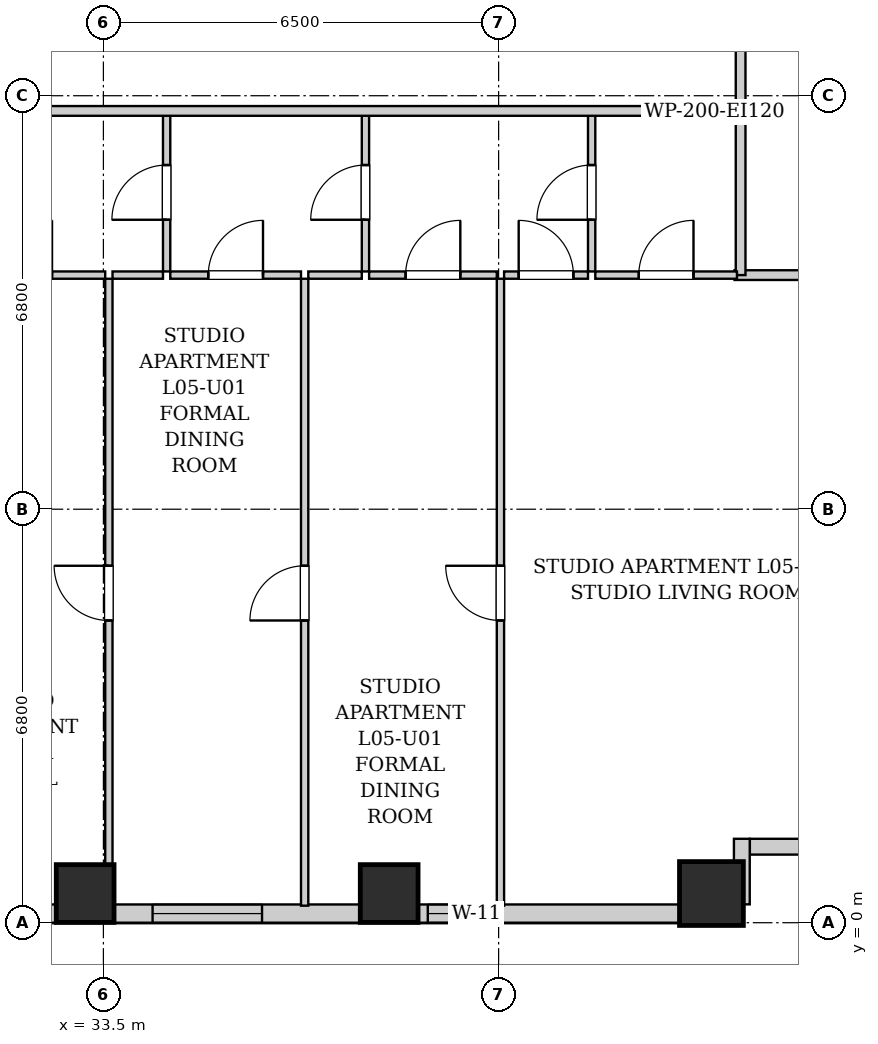
"""IFC4 building model, lengths in metres.
Left out: names, types, materials, properties, quantities, classifications, styles, units other than length and angle.
Written with IfcOpenShell. Run it as: python <this file> out.ifc"""

import sys

from ifc_helpers import new_model, si_unit, direction, frame, frame_2d, origin, origin_2d, place, context, subcontext, project, spatial, rectangle, extrude, element, fill, save


model = new_model("IFC4")
c1 = context("Model", 3, precision=1e-05, world=origin(), true_north=direction((0.0, 1.0)))
c2 = subcontext(c1, "Body", "Model", "MODEL_VIEW")
j1 = project(units=[si_unit("LENGTHUNIT", "METRE"), si_unit("PLANEANGLEUNIT", "RADIAN")], contexts=[c1])
p1 = place(None, origin())
s1 = spatial("IfcSite", under=j1, at=p1, CompositionType="ELEMENT")
p2 = place(p1, origin())
s2 = spatial("IfcBuilding", under=s1, at=p2, CompositionType="ELEMENT")
p3 = place(p2, frame((0.0, 0.0, 25.8)))
s3 = spatial("IfcBuildingStorey", under=s2, at=p3, CompositionType="ELEMENT", Elevation=25.8)
for number, where, z_axis, x_axis in (
    (1, (33.2, 0.48, 0.0), (0.0, 0.0, 1.0), (1.0, 0.0, 0.0)),
    (2, (38.2, 0.48, 0.0), (0.0, 0.0, 1.0), (1.0, 0.0, 0.0)),
):
    element("IfcColumn", number, at=place(p3, frame(where, z_axis=z_axis, x_axis=x_axis)), inside=s3, PredefinedType="COLUMN", context=c2, shape_type="SweptSolid", body=[
        extrude(rectangle(XDim=0.95, YDim=0.95, at=origin_2d()), origin(), (0.0, 0.0, 1.0), 3.2),
    ])
p4 = place(p3, frame((43.5, 0.48, 0.0), z_axis=(0.0, 0.0, 1.0), x_axis=(1.0, 0.0, 0.0)))
e3 = element("IfcColumn", 3, at=p4, inside=s3, PredefinedType="COLUMN", context=c2, shape_type="SweptSolid", body=[
    extrude(rectangle(XDim=1.05, YDim=1.05, at=origin_2d()), origin(), (0.0, 0.0, 1.0), 3.2),
])
p5 = place(p3, frame((44.0, 0.15, 0.0), z_axis=(0.0, 0.0, 1.0), x_axis=(-1.0, 0.0, 0.0)))
e4 = element("IfcWall", 4, at=p5, inside=s3, PredefinedType="SOLIDWALL", context=c2, shape_type="SweptSolid", body=[
    extrude(rectangle(XDim=28.1, YDim=0.3, at=frame_2d((14.05, 0.0))), origin(), (0.0, 0.0, 1.0), 1.975),
])
p6 = place(p5, frame((26.835, 0.0, 0.55)))
e5 = element("IfcOpeningElement", 5, at=p6, cuts=e4, PredefinedType="OPENING", context=c2, shape_type="SweptSolid", body=[
    extrude(rectangle(XDim=0.85, YDim=1.2, at=frame_2d((0.425, 0.6))), frame((0.0, 0.16, 0.0), z_axis=(0.0, -1.0, 0.0), x_axis=(1.0, 0.0, 0.0)), (0.0, 0.0, 1.0), 0.32),
])
p7 = place(p5, frame((23.765, 0.0, 0.55)))
e6 = element("IfcOpeningElement", 6, at=p7, cuts=e4, PredefinedType="OPENING", context=c2, shape_type="SweptSolid", body=[
    extrude(rectangle(XDim=1.8, YDim=1.2, at=frame_2d((0.9, 0.6))), frame((0.0, 0.16, 0.0), z_axis=(0.0, -1.0, 0.0), x_axis=(1.0, 0.0, 0.0)), (0.0, 0.0, 1.0), 0.32),
])
p8 = place(p5, frame((21.5, 0.0, 0.55)))
e7 = element("IfcOpeningElement", 7, at=p8, cuts=e4, PredefinedType="OPENING", context=c2, shape_type="SweptSolid", body=[
    extrude(rectangle(XDim=1.35, YDim=1.2, at=frame_2d((0.675, 0.6))), frame((0.0, 0.16, 0.0), z_axis=(0.0, -1.0, 0.0), x_axis=(1.0, 0.0, 0.0)), (0.0, 0.0, 1.0), 0.32),
])
p9 = place(p5, frame((14.352, 0.0, 0.55)))
e8 = element("IfcOpeningElement", 8, at=p9, cuts=e4, PredefinedType="OPENING", context=c2, shape_type="SweptSolid", body=[
    extrude(rectangle(XDim=1.8, YDim=1.2, at=frame_2d((0.9, 0.6))), frame((0.0, 0.16, 0.0), z_axis=(0.0, -1.0, 0.0), x_axis=(1.0, 0.0, 0.0)), (0.0, 0.0, 1.0), 0.32),
])
p10 = place(p5, frame((11.435, 0.0, 0.55)))
e9 = element("IfcOpeningElement", 9, at=p10, cuts=e4, PredefinedType="OPENING", context=c2, shape_type="SweptSolid", body=[
    extrude(rectangle(XDim=1.8, YDim=1.2, at=frame_2d((0.9, 0.6))), frame((0.0, 0.16, 0.0), z_axis=(0.0, -1.0, 0.0), x_axis=(1.0, 0.0, 0.0)), (0.0, 0.0, 1.0), 0.32),
])
p11 = place(p5, frame((7.891, 0.0, 0.55)))
e10 = element("IfcOpeningElement", 10, at=p11, cuts=e4, PredefinedType="OPENING", context=c2, shape_type="SweptSolid", body=[
    extrude(rectangle(XDim=1.8, YDim=1.2, at=frame_2d((0.9, 0.6))), frame((0.0, 0.16, 0.0), z_axis=(0.0, -1.0, 0.0), x_axis=(1.0, 0.0, 0.0)), (0.0, 0.0, 1.0), 0.32),
])
p12 = place(p5, frame((4.315, 0.0, 0.55)))
e11 = element("IfcOpeningElement", 11, at=p12, cuts=e4, PredefinedType="OPENING", context=c2, shape_type="SweptSolid", body=[
    extrude(rectangle(XDim=0.85, YDim=1.2, at=frame_2d((0.425, 0.6))), frame((0.0, 0.16, 0.0), z_axis=(0.0, -1.0, 0.0), x_axis=(1.0, 0.0, 0.0)), (0.0, 0.0, 1.0), 0.32),
])
p13 = place(p3, frame((45.118, 1.25, 0.0), z_axis=(0.0, 0.0, 1.0), x_axis=(-1.0, 0.0, 0.0)))
e12 = element("IfcWall", 12, at=p13, inside=s3, PredefinedType="SOLIDWALL", context=c2, shape_type="SweptSolid", body=[
    extrude(rectangle(XDim=0.986, YDim=0.26, at=frame_2d((0.493, 0.0))), origin(), (0.0, 0.0, 1.0), 2.94),
])
p14 = place(p3, frame((44.0, 1.38, 0.0), z_axis=(0.0, 0.0, 1.0), x_axis=(0.0, -1.0, 0.0)))
e13 = element("IfcWall", 13, at=p14, inside=s3, PredefinedType="SOLIDWALL", context=c2, shape_type="SweptSolid", body=[
    extrude(rectangle(XDim=1.078, YDim=0.26, at=frame_2d((0.539, 0.0))), origin(), (0.0, 0.0, 1.0), 2.94),
])
p15 = place(p3, frame((43.98, 13.35, 0.0), z_axis=(0.0, 0.0, 1.0), x_axis=(0.0, 1.0, 0.0)))
e14 = element("IfcWall", 14, at=p15, inside=s3, PredefinedType="PARTITIONING", context=c2, shape_type="SweptSolid", body=[
    extrude(rectangle(XDim=1.74, YDim=0.16, at=frame_2d((0.87, 0.0))), origin(), (0.0, 0.0, 1.0), 2.94),
])
p16 = place(p3, frame((43.88, 10.65, 0.0), z_axis=(0.0, 0.0, 1.0), x_axis=(1.0, 0.0, 0.0)))
e15 = element("IfcWall", 15, at=p16, inside=s3, PredefinedType="PARTITIONING", context=c2, shape_type="SweptSolid", body=[
    extrude(rectangle(XDim=2.34, YDim=0.16, at=frame_2d((1.17, 0.0))), origin(), (0.0, 0.0, 1.0), 2.94),
])
p17 = place(p3, frame((43.98, 10.65, 0.0), z_axis=(0.0, 0.0, 1.0), x_axis=(0.0, 1.0, 0.0)))
e16 = element("IfcWall", 16, at=p17, inside=s3, PredefinedType="PARTITIONING", context=c2, shape_type="SweptSolid", body=[
    extrude(rectangle(XDim=2.66, YDim=0.16, at=frame_2d((1.33, 0.0))), origin(), (0.0, 0.0, 1.0), 2.94),
])
p18 = place(p3, frame((34.54, 10.71, 0.0), z_axis=(0.0, 0.0, 1.0), x_axis=(0.0, 1.0, 0.0)))
e17 = element("IfcWall", 17, at=p18, inside=s3, PredefinedType="PARTITIONING", context=c2, shape_type="SweptSolid", body=[
    extrude(rectangle(XDim=2.6, YDim=0.12, at=frame_2d((1.3, 0.0))), origin(), (0.0, 0.0, 1.0), 2.94),
])
p19 = place(p18, frame((0.85, 0.0, 0.0)))
e18 = element("IfcOpeningElement", 18, at=p19, cuts=e17, PredefinedType="OPENING", context=c2, shape_type="SweptSolid", body=[
    extrude(rectangle(XDim=0.9, YDim=2.05, at=frame_2d((0.45, 1.025))), frame((0.0, 0.07, 0.0), z_axis=(0.0, -1.0, 0.0), x_axis=(1.0, 0.0, 0.0)), (0.0, 0.0, 1.0), 0.14),
])
p20 = place(p3, frame((30.88, 10.65, 0.0), z_axis=(0.0, 0.0, 1.0), x_axis=(1.0, 0.0, 0.0)))
e19 = element("IfcWall", 19, at=p20, inside=s3, PredefinedType="PARTITIONING", context=c2, shape_type="SweptSolid", body=[
    extrude(rectangle(XDim=2.65, YDim=0.12, at=frame_2d((1.325, 0.0))), origin(), (0.0, 0.0, 1.0), 2.94),
])
p21 = place(p20, frame((0.875, 0.0, 0.0)))
e20 = element("IfcOpeningElement", 20, at=p21, cuts=e19, PredefinedType="OPENING", context=c2, shape_type="SweptSolid", body=[
    extrude(rectangle(XDim=0.9, YDim=2.05, at=frame_2d((0.45, 1.025))), frame((0.0, 0.07, 0.0), z_axis=(0.0, -1.0, 0.0), x_axis=(1.0, 0.0, 0.0)), (0.0, 0.0, 1.0), 0.14),
])
p22 = place(p3, frame((33.65, 10.65, 0.0), z_axis=(0.0, 0.0, 1.0), x_axis=(1.0, 0.0, 0.0)))
e21 = element("IfcWall", 21, at=p22, inside=s3, PredefinedType="PARTITIONING", context=c2, shape_type="SweptSolid", body=[
    extrude(rectangle(XDim=0.83, YDim=0.12, at=frame_2d((0.415, 0.0))), origin(), (0.0, 0.0, 1.0), 2.94),
])
p23 = place(p3, frame((37.81, 10.71, 0.0), z_axis=(0.0, 0.0, 1.0), x_axis=(0.0, 1.0, 0.0)))
e22 = element("IfcWall", 22, at=p23, inside=s3, PredefinedType="PARTITIONING", context=c2, shape_type="SweptSolid", body=[
    extrude(rectangle(XDim=2.6, YDim=0.12, at=frame_2d((1.3, 0.0))), origin(), (0.0, 0.0, 1.0), 2.94),
])
p24 = place(p23, frame((0.85, 0.0, 0.0)))
e23 = element("IfcOpeningElement", 23, at=p24, cuts=e22, PredefinedType="OPENING", context=c2, shape_type="SweptSolid", body=[
    extrude(rectangle(XDim=0.9, YDim=2.05, at=frame_2d((0.45, 1.025))), frame((0.0, 0.07, 0.0), z_axis=(0.0, -1.0, 0.0), x_axis=(1.0, 0.0, 0.0)), (0.0, 0.0, 1.0), 0.14),
])
p25 = place(p3, frame((34.6, 10.65, 0.0), z_axis=(0.0, 0.0, 1.0), x_axis=(1.0, 0.0, 0.0)))
e24 = element("IfcWall", 24, at=p25, inside=s3, PredefinedType="PARTITIONING", context=c2, shape_type="SweptSolid", body=[
    extrude(rectangle(XDim=2.15, YDim=0.12, at=frame_2d((1.075, 0.0))), origin(), (0.0, 0.0, 1.0), 2.94),
])
p26 = place(p25, frame((0.625, 0.0, 0.0)))
e25 = element("IfcOpeningElement", 25, at=p26, cuts=e24, PredefinedType="OPENING", context=c2, shape_type="SweptSolid", body=[
    extrude(rectangle(XDim=0.9, YDim=2.05, at=frame_2d((0.45, 1.025))), frame((0.0, 0.07, 0.0), z_axis=(0.0, -1.0, 0.0), x_axis=(1.0, 0.0, 0.0)), (0.0, 0.0, 1.0), 0.14),
])
p27 = place(p3, frame((36.87, 10.65, 0.0), z_axis=(0.0, 0.0, 1.0), x_axis=(1.0, 0.0, 0.0)))
e26 = element("IfcWall", 26, at=p27, inside=s3, PredefinedType="PARTITIONING", context=c2, shape_type="SweptSolid", body=[
    extrude(rectangle(XDim=0.88, YDim=0.12, at=frame_2d((0.44, 0.0))), origin(), (0.0, 0.0, 1.0), 2.94),
])
p28 = place(p3, frame((41.53, 10.71, 0.0), z_axis=(0.0, 0.0, 1.0), x_axis=(0.0, 1.0, 0.0)))
e27 = element("IfcWall", 27, at=p28, inside=s3, PredefinedType="PARTITIONING", context=c2, shape_type="SweptSolid", body=[
    extrude(rectangle(XDim=2.6, YDim=0.12, at=frame_2d((1.3, 0.0))), origin(), (0.0, 0.0, 1.0), 2.94),
])
p29 = place(p28, frame((0.85, 0.0, 0.0)))
e28 = element("IfcOpeningElement", 28, at=p29, cuts=e27, PredefinedType="OPENING", context=c2, shape_type="SweptSolid", body=[
    extrude(rectangle(XDim=0.9, YDim=2.05, at=frame_2d((0.45, 1.025))), frame((0.0, 0.07, 0.0), z_axis=(0.0, -1.0, 0.0), x_axis=(1.0, 0.0, 0.0)), (0.0, 0.0, 1.0), 0.14),
])
p30 = place(p3, frame((37.87, 10.65, 0.0), z_axis=(0.0, 0.0, 1.0), x_axis=(1.0, 0.0, 0.0)))
e29 = element("IfcWall", 29, at=p30, inside=s3, PredefinedType="PARTITIONING", context=c2, shape_type="SweptSolid", body=[
    extrude(rectangle(XDim=2.1, YDim=0.12, at=frame_2d((1.05, 0.0))), origin(), (0.0, 0.0, 1.0), 2.94),
])
p31 = place(p30, frame((0.6, 0.0, 0.0)))
e30 = element("IfcOpeningElement", 30, at=p31, cuts=e29, PredefinedType="OPENING", context=c2, shape_type="SweptSolid", body=[
    extrude(rectangle(XDim=0.9, YDim=2.05, at=frame_2d((0.45, 1.025))), frame((0.0, 0.07, 0.0), z_axis=(0.0, -1.0, 0.0), x_axis=(1.0, 0.0, 0.0)), (0.0, 0.0, 1.0), 0.14),
])
p32 = place(p3, frame((40.09, 10.65, 0.0), z_axis=(0.0, 0.0, 1.0), x_axis=(1.0, 0.0, 0.0)))
e31 = element("IfcWall", 31, at=p32, inside=s3, PredefinedType="PARTITIONING", context=c2, shape_type="SweptSolid", body=[
    extrude(rectangle(XDim=1.38, YDim=0.12, at=frame_2d((0.69, 0.0))), origin(), (0.0, 0.0, 1.0), 2.94),
])
p33 = place(p32, frame((0.24, 0.0, 0.0)))
e32 = element("IfcOpeningElement", 32, at=p33, cuts=e31, PredefinedType="OPENING", context=c2, shape_type="SweptSolid", body=[
    extrude(rectangle(XDim=0.9, YDim=2.05, at=frame_2d((0.45, 1.025))), frame((0.0, 0.07, 0.0), z_axis=(0.0, -1.0, 0.0), x_axis=(1.0, 0.0, 0.0)), (0.0, 0.0, 1.0), 0.14),
])
p34 = place(p3, frame((41.59, 10.65, 0.0), z_axis=(0.0, 0.0, 1.0), x_axis=(1.0, 0.0, 0.0)))
e33 = element("IfcWall", 33, at=p34, inside=s3, PredefinedType="PARTITIONING", context=c2, shape_type="SweptSolid", body=[
    extrude(rectangle(XDim=2.33, YDim=0.12, at=frame_2d((1.165, 0.0))), origin(), (0.0, 0.0, 1.0), 2.94),
])
p35 = place(p34, frame((0.715, 0.0, 0.0)))
e34 = element("IfcOpeningElement", 34, at=p35, cuts=e33, PredefinedType="OPENING", context=c2, shape_type="SweptSolid", body=[
    extrude(rectangle(XDim=0.9, YDim=2.05, at=frame_2d((0.45, 1.025))), frame((0.0, 0.07, 0.0), z_axis=(0.0, -1.0, 0.0), x_axis=(1.0, 0.0, 0.0)), (0.0, 0.0, 1.0), 0.14),
])
p36 = place(p3, frame((33.59, 0.28, 0.0), z_axis=(0.0, 0.0, 1.0), x_axis=(0.0, 1.0, 0.0)))
e35 = element("IfcWall", 35, at=p36, inside=s3, PredefinedType="PARTITIONING", context=c2, shape_type="SweptSolid", body=[
    extrude(rectangle(XDim=10.31, YDim=0.12, at=frame_2d((5.155, 0.0))), origin(), (0.0, 0.0, 1.0), 2.94),
])
p37 = place(p36, frame((4.69, 0.0, 0.0)))
e36 = element("IfcOpeningElement", 36, at=p37, cuts=e35, PredefinedType="OPENING", context=c2, shape_type="SweptSolid", body=[
    extrude(rectangle(XDim=0.9, YDim=2.05, at=frame_2d((0.45, 1.025))), frame((0.0, 0.07, 0.0), z_axis=(0.0, -1.0, 0.0), x_axis=(1.0, 0.0, 0.0)), (0.0, 0.0, 1.0), 0.14),
])
p38 = place(p3, frame((36.81, 0.28, 0.0), z_axis=(0.0, 0.0, 1.0), x_axis=(0.0, 1.0, 0.0)))
e37 = element("IfcWall", 37, at=p38, inside=s3, PredefinedType="PARTITIONING", context=c2, shape_type="SweptSolid", body=[
    extrude(rectangle(XDim=10.31, YDim=0.12, at=frame_2d((5.155, 0.0))), origin(), (0.0, 0.0, 1.0), 2.94),
])
p39 = place(p38, frame((4.69, 0.0, 0.0)))
e38 = element("IfcOpeningElement", 38, at=p39, cuts=e37, PredefinedType="OPENING", context=c2, shape_type="SweptSolid", body=[
    extrude(rectangle(XDim=0.9, YDim=2.05, at=frame_2d((0.45, 1.025))), frame((0.0, 0.07, 0.0), z_axis=(0.0, -1.0, 0.0), x_axis=(1.0, 0.0, 0.0)), (0.0, 0.0, 1.0), 0.14),
])
p40 = place(p3, frame((40.03, 0.28, 0.0), z_axis=(0.0, 0.0, 1.0), x_axis=(0.0, 1.0, 0.0)))
e39 = element("IfcWall", 39, at=p40, inside=s3, PredefinedType="PARTITIONING", context=c2, shape_type="SweptSolid", body=[
    extrude(rectangle(XDim=10.31, YDim=0.12, at=frame_2d((5.155, 0.0))), origin(), (0.0, 0.0, 1.0), 2.94),
])
p41 = place(p40, frame((4.69, 0.0, 0.0)))
e40 = element("IfcOpeningElement", 40, at=p41, cuts=e39, PredefinedType="OPENING", context=c2, shape_type="SweptSolid", body=[
    extrude(rectangle(XDim=0.9, YDim=2.05, at=frame_2d((0.45, 1.025))), frame((0.0, 0.07, 0.0), z_axis=(0.0, -1.0, 0.0), x_axis=(1.0, 0.0, 0.0)), (0.0, 0.0, 1.0), 0.14),
])
p42 = place(p3, frame((10.05, 13.35, 0.0), z_axis=(0.0, 0.0, 1.0), x_axis=(1.0, 0.0, 0.0)))
e41 = element("IfcWall", 41, at=p42, inside=s3, PredefinedType="PARTITIONING", context=c2, shape_type="SweptSolid", body=[
    extrude(rectangle(XDim=33.9, YDim=0.16, at=frame_2d((16.95, 0.0))), origin(), (0.0, 0.0, 1.0), 2.94),
])
p43 = place(p42, frame((4.165, 0.0, 0.0)))
e42 = element("IfcOpeningElement", 42, at=p43, cuts=e41, PredefinedType="OPENING", context=c2, shape_type="SweptSolid", body=[
    extrude(rectangle(XDim=0.95, YDim=2.1, at=frame_2d((0.475, 1.05))), frame((0.0, 0.09, 0.0), z_axis=(0.0, -1.0, 0.0), x_axis=(1.0, 0.0, 0.0)), (0.0, 0.0, 1.0), 0.18),
])
p44 = place(p19, origin())
e43 = element("IfcDoor", 43, at=p44, inside=s3, OperationType="SINGLE_SWING_LEFT", PredefinedType="DOOR", context=c2, shape_type="SweptSolid", body=[
    extrude(rectangle(XDim=0.9, YDim=2.05, at=frame_2d((0.45, 1.025))), frame((0.0, 0.025, 0.0), z_axis=(0.0, -1.0, 0.0), x_axis=(1.0, 0.0, 0.0)), (0.0, 0.0, 1.0), 0.05),
])
fill(e18, e43)
p45 = place(p21, origin())
e44 = element("IfcDoor", 44, at=p45, inside=s3, OperationType="SINGLE_SWING_RIGHT", PredefinedType="DOOR", context=c2, shape_type="SweptSolid", body=[
    extrude(rectangle(XDim=0.9, YDim=2.05, at=frame_2d((0.45, 1.025))), frame((0.0, 0.025, 0.0), z_axis=(0.0, -1.0, 0.0), x_axis=(1.0, 0.0, 0.0)), (0.0, 0.0, 1.0), 0.05),
])
fill(e20, e44)
p46 = place(p24, origin())
e45 = element("IfcDoor", 45, at=p46, inside=s3, OperationType="SINGLE_SWING_LEFT", PredefinedType="DOOR", context=c2, shape_type="SweptSolid", body=[
    extrude(rectangle(XDim=0.9, YDim=2.05, at=frame_2d((0.45, 1.025))), frame((0.0, 0.025, 0.0), z_axis=(0.0, -1.0, 0.0), x_axis=(1.0, 0.0, 0.0)), (0.0, 0.0, 1.0), 0.05),
])
fill(e23, e45)
p47 = place(p26, origin())
e46 = element("IfcDoor", 46, at=p47, inside=s3, OperationType="SINGLE_SWING_RIGHT", PredefinedType="DOOR", context=c2, shape_type="SweptSolid", body=[
    extrude(rectangle(XDim=0.9, YDim=2.05, at=frame_2d((0.45, 1.025))), frame((0.0, 0.025, 0.0), z_axis=(0.0, -1.0, 0.0), x_axis=(1.0, 0.0, 0.0)), (0.0, 0.0, 1.0), 0.05),
])
fill(e25, e46)
p48 = place(p29, origin())
e47 = element("IfcDoor", 47, at=p48, inside=s3, OperationType="SINGLE_SWING_LEFT", PredefinedType="DOOR", context=c2, shape_type="SweptSolid", body=[
    extrude(rectangle(XDim=0.9, YDim=2.05, at=frame_2d((0.45, 1.025))), frame((0.0, 0.025, 0.0), z_axis=(0.0, -1.0, 0.0), x_axis=(1.0, 0.0, 0.0)), (0.0, 0.0, 1.0), 0.05),
])
fill(e28, e47)
p49 = place(p31, origin())
e48 = element("IfcDoor", 48, at=p49, inside=s3, OperationType="SINGLE_SWING_RIGHT", PredefinedType="DOOR", context=c2, shape_type="SweptSolid", body=[
    extrude(rectangle(XDim=0.9, YDim=2.05, at=frame_2d((0.45, 1.025))), frame((0.0, 0.025, 0.0), z_axis=(0.0, -1.0, 0.0), x_axis=(1.0, 0.0, 0.0)), (0.0, 0.0, 1.0), 0.05),
])
fill(e30, e48)
p50 = place(p33, origin())
e49 = element("IfcDoor", 49, at=p50, inside=s3, OperationType="SINGLE_SWING_LEFT", PredefinedType="DOOR", context=c2, shape_type="SweptSolid", body=[
    extrude(rectangle(XDim=0.9, YDim=2.05, at=frame_2d((0.45, 1.025))), frame((0.0, 0.025, 0.0), z_axis=(0.0, -1.0, 0.0), x_axis=(1.0, 0.0, 0.0)), (0.0, 0.0, 1.0), 0.05),
])
fill(e32, e49)
p51 = place(p35, origin())
e50 = element("IfcDoor", 50, at=p51, inside=s3, OperationType="SINGLE_SWING_RIGHT", PredefinedType="DOOR", context=c2, shape_type="SweptSolid", body=[
    extrude(rectangle(XDim=0.9, YDim=2.05, at=frame_2d((0.45, 1.025))), frame((0.0, 0.025, 0.0), z_axis=(0.0, -1.0, 0.0), x_axis=(1.0, 0.0, 0.0)), (0.0, 0.0, 1.0), 0.05),
])
fill(e34, e50)
p52 = place(p37, origin())
e51 = element("IfcDoor", 51, at=p52, inside=s3, OperationType="SINGLE_SWING_RIGHT", PredefinedType="DOOR", context=c2, shape_type="SweptSolid", body=[
    extrude(rectangle(XDim=0.9, YDim=2.05, at=frame_2d((0.45, 1.025))), frame((0.0, 0.025, 0.0), z_axis=(0.0, -1.0, 0.0), x_axis=(1.0, 0.0, 0.0)), (0.0, 0.0, 1.0), 0.05),
])
fill(e36, e51)
p53 = place(p39, origin())
e52 = element("IfcDoor", 52, at=p53, inside=s3, OperationType="SINGLE_SWING_LEFT", PredefinedType="DOOR", context=c2, shape_type="SweptSolid", body=[
    extrude(rectangle(XDim=0.9, YDim=2.05, at=frame_2d((0.45, 1.025))), frame((0.0, 0.025, 0.0), z_axis=(0.0, -1.0, 0.0), x_axis=(1.0, 0.0, 0.0)), (0.0, 0.0, 1.0), 0.05),
])
fill(e38, e52)
p54 = place(p41, origin())
e53 = element("IfcDoor", 53, at=p54, inside=s3, OperationType="SINGLE_SWING_RIGHT", PredefinedType="DOOR", context=c2, shape_type="SweptSolid", body=[
    extrude(rectangle(XDim=0.9, YDim=2.05, at=frame_2d((0.45, 1.025))), frame((0.0, 0.025, 0.0), z_axis=(0.0, -1.0, 0.0), x_axis=(1.0, 0.0, 0.0)), (0.0, 0.0, 1.0), 0.05),
])
fill(e40, e53)
p55 = place(p11, origin())
e54 = element("IfcWindow", 54, at=p55, inside=s3, PartitioningType="DOUBLE_PANEL_VERTICAL", PredefinedType="WINDOW", context=c2, shape_type="SweptSolid", body=[
    extrude(rectangle(XDim=1.8, YDim=1.2, at=frame_2d((0.9, 0.6))), frame((0.0, 0.03, 0.0), z_axis=(0.0, -1.0, 0.0), x_axis=(1.0, 0.0, 0.0)), (0.0, 0.0, 1.0), 0.06),
])
fill(e10, e54)
p56 = place(p12, origin())
e55 = element("IfcWindow", 55, at=p56, inside=s3, PartitioningType="SINGLE_PANEL", PredefinedType="WINDOW", context=c2, shape_type="SweptSolid", body=[
    extrude(rectangle(XDim=0.85, YDim=1.2, at=frame_2d((0.425, 0.6))), frame((0.0, 0.03, 0.0), z_axis=(0.0, -1.0, 0.0), x_axis=(1.0, 0.0, 0.0)), (0.0, 0.0, 1.0), 0.06),
])
fill(e11, e55)
save(model, sys.argv[1])
